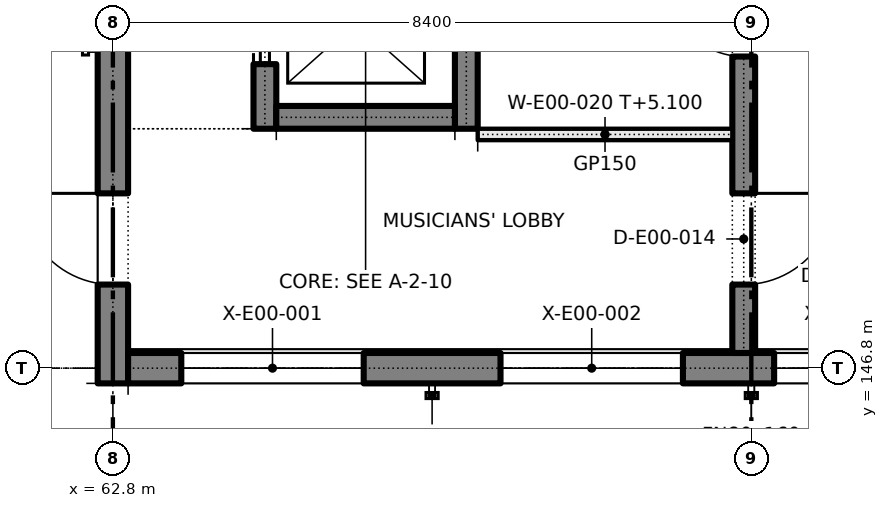
"""IFC4 building model, lengths in metres.
Left out: names, types, materials, properties, quantities, classifications, styles, units other than length and angle.
Written with IfcOpenShell. Run it as: python <this file> out.ifc"""

import sys

from ifc_helpers import new_model, si_unit, direction, frame, frame_2d, origin, place, context, subcontext, project, spatial, rectangle, extrude, element, fill, save


model = new_model("IFC4")
c1 = context("Model", 3, precision=1e-05, world=origin(), true_north=direction((0.0, 1.0)))
c2 = subcontext(c1, "Body", "Model", "MODEL_VIEW")
j1 = project(units=[si_unit("LENGTHUNIT", "METRE"), si_unit("PLANEANGLEUNIT", "RADIAN")], contexts=[c1])
p1 = place(None, origin())
s1 = spatial("IfcSite", under=j1, at=p1, CompositionType="ELEMENT")
p2 = place(p1, origin())
s2 = spatial("IfcBuilding", under=s1, at=p2, CompositionType="ELEMENT")
p3 = place(p2, origin())
s3 = spatial("IfcBuildingStorey", under=s2, at=p3, CompositionType="ELEMENT", Elevation=0.0)
p4 = place(p3, frame((62.8, 146.6, 0.0), z_axis=(0.0, 0.0, 1.0), x_axis=(0.0, 1.0, 0.0)))
e1 = element("IfcWall", 1, at=p4, inside=s3, PredefinedType="SOLIDWALL", context=c2, shape_type="SweptSolid", body=[
    extrude(rectangle(XDim=25.6, YDim=0.4, at=frame_2d((12.8, 0.0))), origin(), (0.0, 0.0, 1.0), 5.4),
])
p5 = place(p4, frame((23.3, 0.0, 0.0)))
e2 = element("IfcOpeningElement", 2, at=p5, cuts=e1, PredefinedType="OPENING", context=c2, shape_type="SweptSolid", body=[
    extrude(rectangle(XDim=1.2, YDim=2.1, at=frame_2d((0.6, 1.05))), frame((0.0, 0.21, 0.0), z_axis=(0.0, -1.0, 0.0), x_axis=(1.0, 0.0, 0.0)), (0.0, 0.0, 1.0), 0.42),
])
p6 = place(p4, frame((1.3, 0.0, 0.0)))
e3 = element("IfcOpeningElement", 3, at=p6, cuts=e1, PredefinedType="OPENING", context=c2, shape_type="SweptSolid", body=[
    extrude(rectangle(XDim=1.2, YDim=2.1, at=frame_2d((0.6, 1.05))), frame((0.0, 0.21, 0.0), z_axis=(0.0, -1.0, 0.0), x_axis=(1.0, 0.0, 0.0)), (0.0, 0.0, 1.0), 0.42),
])
p7 = place(p4, frame((5.3, 0.0, 0.9)))
e4 = element("IfcOpeningElement", 4, at=p7, cuts=e1, PredefinedType="OPENING", context=c2, shape_type="SweptSolid", body=[
    extrude(rectangle(XDim=2.4, YDim=2.4, at=frame_2d((1.2, 1.2))), frame((0.0, 0.21, 0.0), z_axis=(0.0, -1.0, 0.0), x_axis=(1.0, 0.0, 0.0)), (0.0, 0.0, 1.0), 0.42),
])
p8 = place(p4, frame((9.5, 0.0, 0.9)))
e5 = element("IfcOpeningElement", 5, at=p8, cuts=e1, PredefinedType="OPENING", context=c2, shape_type="SweptSolid", body=[
    extrude(rectangle(XDim=2.4, YDim=2.4, at=frame_2d((1.2, 1.2))), frame((0.0, 0.21, 0.0), z_axis=(0.0, -1.0, 0.0), x_axis=(1.0, 0.0, 0.0)), (0.0, 0.0, 1.0), 0.42),
])
p9 = place(p4, frame((13.7, 0.0, 0.9)))
e6 = element("IfcOpeningElement", 6, at=p9, cuts=e1, PredefinedType="OPENING", context=c2, shape_type="SweptSolid", body=[
    extrude(rectangle(XDim=2.4, YDim=2.4, at=frame_2d((1.2, 1.2))), frame((0.0, 0.21, 0.0), z_axis=(0.0, -1.0, 0.0), x_axis=(1.0, 0.0, 0.0)), (0.0, 0.0, 1.0), 0.42),
])
p10 = place(p4, frame((17.9, 0.0, 0.9)))
e7 = element("IfcOpeningElement", 7, at=p10, cuts=e1, PredefinedType="OPENING", context=c2, shape_type="SweptSolid", body=[
    extrude(rectangle(XDim=2.4, YDim=2.4, at=frame_2d((1.2, 1.2))), frame((0.0, 0.21, 0.0), z_axis=(0.0, -1.0, 0.0), x_axis=(1.0, 0.0, 0.0)), (0.0, 0.0, 1.0), 0.42),
])
p11 = place(p3, frame((63.0, 146.8, 0.0), z_axis=(0.0, 0.0, 1.0), x_axis=(1.0, 0.0, 0.0)))
e8 = element("IfcWall", 8, at=p11, inside=s3, PredefinedType="SOLIDWALL", context=c2, shape_type="SweptSolid", body=[
    extrude(rectangle(XDim=24.8, YDim=0.4, at=frame_2d((12.4, 0.0))), origin(), (0.0, 0.0, 1.0), 5.4),
])
p12 = place(p11, frame((10.9, 0.0, 0.0)))
e9 = element("IfcOpeningElement", 9, at=p12, cuts=e8, PredefinedType="OPENING", context=c2, shape_type="SweptSolid", body=[
    extrude(rectangle(XDim=3.0, YDim=2.5, at=frame_2d((1.5, 1.25))), frame((0.0, 0.21, 0.0), z_axis=(0.0, -1.0, 0.0), x_axis=(1.0, 0.0, 0.0)), (0.0, 0.0, 1.0), 0.42),
])
p13 = place(p11, frame((16.9, 0.0, 0.0)))
e10 = element("IfcOpeningElement", 10, at=p13, cuts=e8, PredefinedType="OPENING", context=c2, shape_type="SweptSolid", body=[
    extrude(rectangle(XDim=1.2, YDim=2.1, at=frame_2d((0.6, 1.05))), frame((0.0, 0.21, 0.0), z_axis=(0.0, -1.0, 0.0), x_axis=(1.0, 0.0, 0.0)), (0.0, 0.0, 1.0), 0.42),
])
p14 = place(p11, frame((0.7, 0.0, 0.9)))
e11 = element("IfcOpeningElement", 11, at=p14, cuts=e8, PredefinedType="OPENING", context=c2, shape_type="SweptSolid", body=[
    extrude(rectangle(XDim=2.4, YDim=2.4, at=frame_2d((1.2, 1.2))), frame((0.0, 0.21, 0.0), z_axis=(0.0, -1.0, 0.0), x_axis=(1.0, 0.0, 0.0)), (0.0, 0.0, 1.0), 0.42),
])
p15 = place(p11, frame((4.9, 0.0, 0.9)))
e12 = element("IfcOpeningElement", 12, at=p15, cuts=e8, PredefinedType="OPENING", context=c2, shape_type="SweptSolid", body=[
    extrude(rectangle(XDim=2.4, YDim=2.4, at=frame_2d((1.2, 1.2))), frame((0.0, 0.21, 0.0), z_axis=(0.0, -1.0, 0.0), x_axis=(1.0, 0.0, 0.0)), (0.0, 0.0, 1.0), 0.42),
])
p16 = place(p11, frame((8.5, 0.0, 0.9)))
e13 = element("IfcOpeningElement", 13, at=p16, cuts=e8, PredefinedType="OPENING", context=c2, shape_type="SweptSolid", body=[
    extrude(rectangle(XDim=2.1, YDim=2.4, at=frame_2d((1.05, 1.2))), frame((0.0, 0.21, 0.0), z_axis=(0.0, -1.0, 0.0), x_axis=(1.0, 0.0, 0.0)), (0.0, 0.0, 1.0), 0.42),
])
p17 = place(p11, frame((14.2, 0.0, 0.9)))
e14 = element("IfcOpeningElement", 14, at=p17, cuts=e8, PredefinedType="OPENING", context=c2, shape_type="SweptSolid", body=[
    extrude(rectangle(XDim=2.1, YDim=2.4, at=frame_2d((1.05, 1.2))), frame((0.0, 0.21, 0.0), z_axis=(0.0, -1.0, 0.0), x_axis=(1.0, 0.0, 0.0)), (0.0, 0.0, 1.0), 0.42),
])
p18 = place(p3, frame((71.1, 147.0, 0.0), z_axis=(0.0, 0.0, 1.0), x_axis=(0.0, 1.0, 0.0)))
e15 = element("IfcWall", 15, at=p18, inside=s3, PredefinedType="SOLIDWALL", context=c2, shape_type="SweptSolid", body=[
    extrude(rectangle(XDim=24.8, YDim=0.3, at=frame_2d((12.4, 0.0))), origin(), (0.0, 0.0, 1.0), 5.4),
])
p19 = place(p18, frame((0.9, 0.0, 0.0)))
e16 = element("IfcOpeningElement", 16, at=p19, cuts=e15, PredefinedType="OPENING", context=c2, shape_type="SweptSolid", body=[
    extrude(rectangle(XDim=1.2, YDim=2.1, at=frame_2d((0.6, 1.05))), frame((0.0, 0.16, 0.0), z_axis=(0.0, -1.0, 0.0), x_axis=(1.0, 0.0, 0.0)), (0.0, 0.0, 1.0), 0.32),
])
p20 = place(p18, frame((3.9, 0.0, 0.0)))
e17 = element("IfcOpeningElement", 17, at=p20, cuts=e15, PredefinedType="OPENING", context=c2, shape_type="SweptSolid", body=[
    extrude(rectangle(XDim=1.0, YDim=2.1, at=frame_2d((0.5, 1.05))), frame((0.0, 0.16, 0.0), z_axis=(0.0, -1.0, 0.0), x_axis=(1.0, 0.0, 0.0)), (0.0, 0.0, 1.0), 0.32),
])
p21 = place(p18, frame((15.9, 0.0, 0.0)))
e18 = element("IfcOpeningElement", 18, at=p21, cuts=e15, PredefinedType="OPENING", context=c2, shape_type="SweptSolid", body=[
    extrude(rectangle(XDim=1.0, YDim=2.1, at=frame_2d((0.5, 1.05))), frame((0.0, 0.16, 0.0), z_axis=(0.0, -1.0, 0.0), x_axis=(1.0, 0.0, 0.0)), (0.0, 0.0, 1.0), 0.32),
])
p22 = place(p3, frame((64.8, 149.95, 0.0), z_axis=(0.0, 0.0, 1.0), x_axis=(0.0, 1.0, 0.0)))
e19 = element("IfcWall", 19, at=p22, inside=s3, PredefinedType="SOLIDWALL", context=c2, shape_type="SweptSolid", body=[
    extrude(rectangle(XDim=2.8, YDim=0.3, at=frame_2d((1.4, 0.0))), origin(), (0.0, 0.0, 1.0), 5.4),
])
p23 = place(p22, frame((0.85, 0.0, 0.0)))
e20 = element("IfcOpeningElement", 20, at=p23, cuts=e19, PredefinedType="OPENING", context=c2, shape_type="SweptSolid", body=[
    extrude(rectangle(XDim=1.1, YDim=2.1, at=frame_2d((0.55, 1.05))), frame((0.0, 0.16, 0.0), z_axis=(0.0, -1.0, 0.0), x_axis=(1.0, 0.0, 0.0)), (0.0, 0.0, 1.0), 0.32),
])
p24 = place(p3, frame((67.45, 149.95, 0.0), z_axis=(0.0, 0.0, 1.0), x_axis=(0.0, 1.0, 0.0)))
e21 = element("IfcWall", 21, at=p24, inside=s3, PredefinedType="SOLIDWALL", context=c2, shape_type="SweptSolid", body=[
    extrude(rectangle(XDim=2.8, YDim=0.3, at=frame_2d((1.4, 0.0))), origin(), (0.0, 0.0, 1.0), 5.4),
])
p25 = place(p3, frame((64.95, 150.1, 0.0), z_axis=(0.0, 0.0, 1.0), x_axis=(1.0, 0.0, 0.0)))
e22 = element("IfcWall", 22, at=p25, inside=s3, PredefinedType="SOLIDWALL", context=c2, shape_type="SweptSolid", body=[
    extrude(rectangle(XDim=2.35, YDim=0.3, at=frame_2d((1.175, 0.0))), origin(), (0.0, 0.0, 1.0), 5.4),
])
p26 = place(p3, frame((67.6, 149.875, 0.0), z_axis=(0.0, 0.0, 1.0), x_axis=(1.0, 0.0, 0.0)))
e23 = element("IfcWall", 23, at=p26, inside=s3, PredefinedType="PARTITIONING", context=c2, shape_type="SweptSolid", body=[
    extrude(rectangle(XDim=3.35, YDim=0.15, at=frame_2d((1.675, 0.0))), origin(), (0.0, 0.0, 1.0), 5.1),
])
p27 = place(p23, origin())
e24 = element("IfcDoor", 24, at=p27, inside=s3, OperationType="SLIDING_TO_LEFT", PredefinedType="DOOR", context=c2, shape_type="SweptSolid", body=[
    extrude(rectangle(XDim=1.1, YDim=2.1, at=frame_2d((0.55, 1.05))), frame((0.0, 0.025, 0.0), z_axis=(0.0, -1.0, 0.0), x_axis=(1.0, 0.0, 0.0)), (0.0, 0.0, 1.0), 0.05),
])
fill(e20, e24)
p28 = place(p6, origin())
e25 = element("IfcDoor", 25, at=p28, inside=s3, OperationType="SINGLE_SWING_RIGHT", PredefinedType="DOOR", context=c2, shape_type="SweptSolid", body=[
    extrude(rectangle(XDim=1.2, YDim=2.1, at=frame_2d((0.6, 1.05))), frame((0.0, 0.025, 0.0), z_axis=(0.0, -1.0, 0.0), x_axis=(1.0, 0.0, 0.0)), (0.0, 0.0, 1.0), 0.05),
])
fill(e3, e25)
p29 = place(p14, origin())
e26 = element("IfcWindow", 26, at=p29, inside=s3, PartitioningType="SINGLE_PANEL", PredefinedType="WINDOW", context=c2, shape_type="SweptSolid", body=[
    extrude(rectangle(XDim=2.4, YDim=2.4, at=frame_2d((1.2, 1.2))), frame((0.0, 0.03, 0.0), z_axis=(0.0, -1.0, 0.0), x_axis=(1.0, 0.0, 0.0)), (0.0, 0.0, 1.0), 0.06),
])
fill(e11, e26)
p30 = place(p15, origin())
e27 = element("IfcWindow", 27, at=p30, inside=s3, PartitioningType="SINGLE_PANEL", PredefinedType="WINDOW", context=c2, shape_type="SweptSolid", body=[
    extrude(rectangle(XDim=2.4, YDim=2.4, at=frame_2d((1.2, 1.2))), frame((0.0, 0.03, 0.0), z_axis=(0.0, -1.0, 0.0), x_axis=(1.0, 0.0, 0.0)), (0.0, 0.0, 1.0), 0.06),
])
fill(e12, e27)
p31 = place(p16, origin())
e28 = element("IfcWindow", 28, at=p31, inside=s3, PartitioningType="SINGLE_PANEL", PredefinedType="WINDOW", context=c2, shape_type="SweptSolid", body=[
    extrude(rectangle(XDim=2.1, YDim=2.4, at=frame_2d((1.05, 1.2))), frame((0.0, 0.03, 0.0), z_axis=(0.0, -1.0, 0.0), x_axis=(1.0, 0.0, 0.0)), (0.0, 0.0, 1.0), 0.06),
])
fill(e13, e28)
p32 = place(p19, frame((1.2, 0.0, 0.0), z_axis=(0.0, 0.0, 1.0), x_axis=(-1.0, 0.0, 0.0)))
e29 = element("IfcDoor", 29, at=p32, inside=s3, OperationType="SINGLE_SWING_LEFT", PredefinedType="DOOR", context=c2, shape_type="SweptSolid", body=[
    extrude(rectangle(XDim=1.2, YDim=2.1, at=frame_2d((0.6, 1.05))), frame((0.0, 0.025, 0.0), z_axis=(0.0, -1.0, 0.0), x_axis=(1.0, 0.0, 0.0)), (0.0, 0.0, 1.0), 0.05),
])
fill(e16, e29)
p33 = place(p20, origin())
e30 = element("IfcDoor", 30, at=p33, inside=s3, OperationType="SINGLE_SWING_RIGHT", PredefinedType="DOOR", context=c2, shape_type="SweptSolid", body=[
    extrude(rectangle(XDim=1.0, YDim=2.1, at=frame_2d((0.5, 1.05))), frame((0.0, 0.025, 0.0), z_axis=(0.0, -1.0, 0.0), x_axis=(1.0, 0.0, 0.0)), (0.0, 0.0, 1.0), 0.05),
])
fill(e17, e30)
save(model, sys.argv[1])
